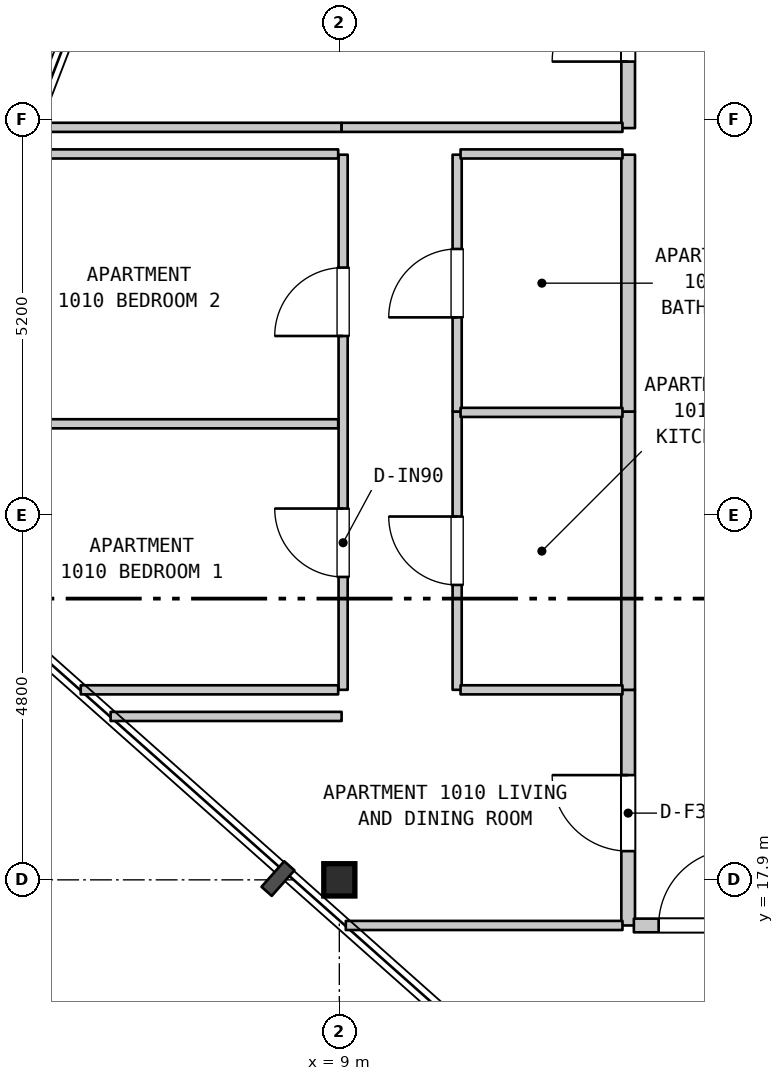
"""IFC4 building model, lengths in metres.
Left out: names, types, materials, properties, quantities, classifications, styles, units other than length and angle.
Written with IfcOpenShell. Run it as: python <this file> out.ifc"""

import sys

from ifc_helpers import new_model, si_unit, direction, frame, frame_2d, origin, origin_2d, place, context, subcontext, project, spatial, rectangle, i_section, extrude, element, fill, save


model = new_model("IFC4")
c1 = context("Model", 3, precision=1e-05, world=origin(), true_north=direction((0.0, 1.0)))
c2 = subcontext(c1, "Body", "Model", "MODEL_VIEW")
j1 = project(units=[si_unit("LENGTHUNIT", "METRE"), si_unit("PLANEANGLEUNIT", "RADIAN")], contexts=[c1])
p1 = place(None, origin())
s1 = spatial("IfcSite", under=j1, at=p1, CompositionType="ELEMENT")
p2 = place(p1, origin())
s2 = spatial("IfcBuilding", under=s1, at=p2, CompositionType="ELEMENT")
p3 = place(p2, frame((0.0, 0.0, 46.2)))
s3 = spatial("IfcBuildingStorey", under=s2, at=p3, CompositionType="ELEMENT", Elevation=46.2)
p4 = place(p3, frame((9.0, 17.9, 0.0), z_axis=(0.0, 0.0, 1.0), x_axis=(1.0, 0.0, 0.0)))
e1 = element("IfcColumn", 1, at=p4, inside=s3, PredefinedType="COLUMN", context=c2, shape_type="SweptSolid", body=[
    extrude(i_section(OverallWidth=0.409, OverallDepth=0.425, WebThickness=0.032, FlangeThickness=0.052, FilletRadius=0.015, at=origin_2d()), origin(), (0.0, 0.0, 1.0), 3.7),
])
p5 = place(p3, frame((9.05, 20.4, 0.0), z_axis=(0.0, 0.0, 1.0), x_axis=(0.0, 1.0, 0.0)))
e2 = element("IfcWall", 2, at=p5, inside=s3, PredefinedType="PARTITIONING", context=c2, shape_type="SweptSolid", body=[
    extrude(rectangle(XDim=7.04, YDim=0.12, at=frame_2d((3.52, 0.0))), origin(), (0.0, 0.0, 1.0), 2.785),
])
p6 = place(p5, frame((1.485, 0.0, 0.0)))
e3 = element("IfcOpeningElement", 3, at=p6, cuts=e2, PredefinedType="OPENING", context=c2, shape_type="SweptSolid", body=[
    extrude(rectangle(XDim=0.9, YDim=2.15, at=frame_2d((0.45, 1.075))), frame((0.0, 0.07, 0.0), z_axis=(0.0, -1.0, 0.0), x_axis=(1.0, 0.0, 0.0)), (0.0, 0.0, 1.0), 0.14),
])
p7 = place(p5, frame((4.655, 0.0, 0.0)))
e4 = element("IfcOpeningElement", 4, at=p7, cuts=e2, PredefinedType="OPENING", context=c2, shape_type="SweptSolid", body=[
    extrude(rectangle(XDim=0.9, YDim=2.15, at=frame_2d((0.45, 1.075))), frame((0.0, 0.07, 0.0), z_axis=(0.0, -1.0, 0.0), x_axis=(1.0, 0.0, 0.0)), (0.0, 0.0, 1.0), 0.14),
])
p8 = place(p3, frame((10.55, 20.4, 0.0), z_axis=(0.0, 0.0, 1.0), x_axis=(0.0, 1.0, 0.0)))
e5 = element("IfcWall", 5, at=p8, inside=s3, PredefinedType="PARTITIONING", context=c2, shape_type="SweptSolid", body=[
    extrude(rectangle(XDim=3.661, YDim=0.12, at=frame_2d((1.831, 0.0))), origin(), (0.0, 0.0, 1.0), 3.385),
])
p9 = place(p8, frame((1.38, 0.0, 0.0)))
e6 = element("IfcOpeningElement", 6, at=p9, cuts=e5, PredefinedType="OPENING", context=c2, shape_type="SweptSolid", body=[
    extrude(rectangle(XDim=0.9, YDim=2.15, at=frame_2d((0.45, 1.075))), frame((0.0, 0.07, 0.0), z_axis=(0.0, -1.0, 0.0), x_axis=(1.0, 0.0, 0.0)), (0.0, 0.0, 1.0), 0.14),
])
p10 = place(p3, frame((10.55, 24.061, 0.0), z_axis=(0.0, 0.0, 1.0), x_axis=(0.0, 1.0, 0.0)))
e7 = element("IfcWall", 7, at=p10, inside=s3, PredefinedType="PARTITIONING", context=c2, shape_type="SweptSolid", body=[
    extrude(rectangle(XDim=3.379, YDim=0.12, at=frame_2d((1.689, 0.0))), origin(), (0.0, 0.0, 1.0), 3.385),
])
p11 = place(p10, frame((1.239, 0.0, 0.0)))
e8 = element("IfcOpeningElement", 8, at=p11, cuts=e7, PredefinedType="OPENING", context=c2, shape_type="SweptSolid", body=[
    extrude(rectangle(XDim=0.9, YDim=2.1, at=frame_2d((0.45, 1.05))), frame((0.0, 0.07, 0.0), z_axis=(0.0, -1.0, 0.0), x_axis=(1.0, 0.0, 0.0)), (0.0, 0.0, 1.0), 0.14),
])
p12 = place(p3, frame((12.8, 17.3, 0.0), z_axis=(0.0, 0.0, 1.0), x_axis=(0.0, 1.0, 0.0)))
e9 = element("IfcWall", 9, at=p12, inside=s3, PredefinedType="STANDARD", context=c2, shape_type="SweptSolid", body=[
    extrude(rectangle(XDim=3.1, YDim=0.18, at=frame_2d((1.55, 0.0))), origin(), (0.0, 0.0, 1.0), 3.385),
])
p13 = place(p12, frame((0.978, 0.0, 0.0)))
e10 = element("IfcOpeningElement", 10, at=p13, cuts=e9, PredefinedType="OPENING", context=c2, shape_type="SweptSolid", body=[
    extrude(rectangle(XDim=1.0, YDim=2.15, at=frame_2d((0.5, 1.075))), frame((0.0, 0.1, 0.0), z_axis=(0.0, -1.0, 0.0), x_axis=(1.0, 0.0, 0.0)), (0.0, 0.0, 1.0), 0.2),
])
p14 = place(p3, frame((12.8, 20.4, 0.0), z_axis=(0.0, 0.0, 1.0), x_axis=(0.0, 1.0, 0.0)))
e11 = element("IfcWall", 11, at=p14, inside=s3, PredefinedType="STANDARD", context=c2, shape_type="SweptSolid", body=[
    extrude(rectangle(XDim=3.661, YDim=0.18, at=frame_2d((1.831, 0.0))), origin(), (0.0, 0.0, 1.0), 3.385),
])
p15 = place(p3, frame((12.8, 24.061, 0.0), z_axis=(0.0, 0.0, 1.0), x_axis=(0.0, 1.0, 0.0)))
e12 = element("IfcWall", 12, at=p15, inside=s3, PredefinedType="STANDARD", context=c2, shape_type="SweptSolid", body=[
    extrude(rectangle(XDim=3.379, YDim=0.18, at=frame_2d((1.689, 0.0))), origin(), (0.0, 0.0, 1.0), 3.385),
])
p16 = place(p3, frame((12.8, 27.79, 0.0), z_axis=(0.0, 0.0, 1.0), x_axis=(0.0, 1.0, 0.0)))
e13 = element("IfcWall", 13, at=p16, inside=s3, PredefinedType="STANDARD", context=c2, shape_type="SweptSolid", body=[
    extrude(rectangle(XDim=2.75, YDim=0.18, at=frame_2d((1.375, 0.0))), origin(), (0.0, 0.0, 1.0), 3.385),
])
p17 = place(p16, frame((0.875, 0.0, 0.0)))
e14 = element("IfcOpeningElement", 14, at=p17, cuts=e13, PredefinedType="OPENING", context=c2, shape_type="SweptSolid", body=[
    extrude(rectangle(XDim=1.0, YDim=2.15, at=frame_2d((0.5, 1.075))), frame((0.0, 0.1, 0.0), z_axis=(0.0, -1.0, 0.0), x_axis=(1.0, 0.0, 0.0)), (0.0, 0.0, 1.0), 0.2),
])
p18 = place(p3, frame((9.085, 17.3, 0.0), z_axis=(0.0, 0.0, 1.0), x_axis=(1.0, 0.0, 0.0)))
e15 = element("IfcWall", 15, at=p18, inside=s3, PredefinedType="PARTITIONING", context=c2, shape_type="SweptSolid", body=[
    extrude(rectangle(XDim=3.64, YDim=0.12, at=frame_2d((1.82, 0.0))), origin(), (0.0, 0.0, 1.0), 3.385),
])
p19 = place(p3, frame((12.875, 17.3, 0.0), z_axis=(0.0, 0.0, 1.0), x_axis=(1.0, 0.0, 0.0)))
e16 = element("IfcWall", 16, at=p19, inside=s3, PredefinedType="STANDARD", context=c2, shape_type="SweptSolid", body=[
    extrude(rectangle(XDim=3.28, YDim=0.18, at=frame_2d((1.64, 0.0))), origin(), (0.0, 0.0, 1.0), 3.385),
])
p20 = place(p19, frame((0.326, 0.0, 0.0)))
e17 = element("IfcOpeningElement", 17, at=p20, cuts=e16, PredefinedType="OPENING", context=c2, shape_type="SweptSolid", body=[
    extrude(rectangle(XDim=1.0, YDim=2.15, at=frame_2d((0.5, 1.075))), frame((0.0, 0.1, 0.0), z_axis=(0.0, -1.0, 0.0), x_axis=(1.0, 0.0, 0.0)), (0.0, 0.0, 1.0), 0.2),
])
p21 = place(p3, frame((5.991, 20.05, 0.0), z_axis=(0.0, 0.0, 1.0), x_axis=(1.0, 0.0, 0.0)))
e18 = element("IfcWall", 18, at=p21, inside=s3, PredefinedType="PARTITIONING", context=c2, shape_type="SweptSolid", body=[
    extrude(rectangle(XDim=3.039, YDim=0.12, at=frame_2d((1.52, 0.0))), origin(), (0.0, 0.0, 1.0), 3.385),
])
p22 = place(p3, frame((5.598, 20.4, 0.0), z_axis=(0.0, 0.0, 1.0), x_axis=(1.0, 0.0, 0.0)))
e19 = element("IfcWall", 19, at=p22, inside=s3, PredefinedType="PARTITIONING", context=c2, shape_type="SweptSolid", body=[
    extrude(rectangle(XDim=3.387, YDim=0.12, at=frame_2d((1.694, 0.0))), origin(), (0.0, 0.0, 1.0), 3.385),
])
p23 = place(p3, frame((10.595, 20.4, 0.0), z_axis=(0.0, 0.0, 1.0), x_axis=(1.0, 0.0, 0.0)))
e20 = element("IfcWall", 20, at=p23, inside=s3, PredefinedType="PARTITIONING", context=c2, shape_type="SweptSolid", body=[
    extrude(rectangle(XDim=2.13, YDim=0.12, at=frame_2d((1.065, 0.0))), origin(), (0.0, 0.0, 1.0), 3.385),
])
p24 = place(p3, frame((3.501, 23.9, 0.0), z_axis=(0.0, 0.0, 1.0), x_axis=(1.0, 0.0, 0.0)))
e21 = element("IfcWall", 21, at=p24, inside=s3, PredefinedType="PARTITIONING", context=c2, shape_type="SweptSolid", body=[
    extrude(rectangle(XDim=5.484, YDim=0.12, at=frame_2d((2.742, 0.0))), origin(), (0.0, 0.0, 1.0), 3.385),
])
p25 = place(p3, frame((10.595, 24.05, 0.0), z_axis=(0.0, 0.0, 1.0), x_axis=(1.0, 0.0, 0.0)))
e22 = element("IfcWall", 22, at=p25, inside=s3, PredefinedType="PARTITIONING", context=c2, shape_type="SweptSolid", body=[
    extrude(rectangle(XDim=2.13, YDim=0.12, at=frame_2d((1.065, 0.0))), origin(), (0.0, 0.0, 1.0), 3.385),
])
p26 = place(p3, frame((4.837, 27.45, 0.0), z_axis=(0.0, 0.0, 1.0), x_axis=(1.0, 0.0, 0.0)))
e23 = element("IfcWall", 23, at=p26, inside=s3, PredefinedType="PARTITIONING", context=c2, shape_type="SweptSolid", body=[
    extrude(rectangle(XDim=4.148, YDim=0.12, at=frame_2d((2.074, 0.0))), origin(), (0.0, 0.0, 1.0), 3.385),
])
p27 = place(p3, frame((10.595, 27.45, 0.0), z_axis=(0.0, 0.0, 1.0), x_axis=(1.0, 0.0, 0.0)))
e24 = element("IfcWall", 24, at=p27, inside=s3, PredefinedType="PARTITIONING", context=c2, shape_type="SweptSolid", body=[
    extrude(rectangle(XDim=2.13, YDim=0.12, at=frame_2d((1.065, 0.0))), origin(), (0.0, 0.0, 1.0), 3.385),
])
p28 = place(p3, frame((4.971, 27.8, 0.0), z_axis=(0.0, 0.0, 1.0), x_axis=(1.0, 0.0, 0.0)))
e25 = element("IfcWall", 25, at=p28, inside=s3, PredefinedType="PARTITIONING", context=c2, shape_type="SweptSolid", body=[
    extrude(rectangle(XDim=4.059, YDim=0.12, at=frame_2d((2.03, 0.0))), origin(), (0.0, 0.0, 1.0), 3.385),
])
p29 = place(p3, frame((9.03, 27.8, 0.0), z_axis=(0.0, 0.0, 1.0), x_axis=(1.0, 0.0, 0.0)))
e26 = element("IfcWall", 26, at=p29, inside=s3, PredefinedType="PARTITIONING", context=c2, shape_type="SweptSolid", body=[
    extrude(rectangle(XDim=3.695, YDim=0.12, at=frame_2d((1.848, 0.0))), origin(), (0.0, 0.0, 1.0), 3.385),
])
p30 = place(p6, origin())
e27 = element("IfcDoor", 27, at=p30, inside=s3, OperationType="SINGLE_SWING_RIGHT", PredefinedType="DOOR", context=c2, shape_type="SweptSolid", body=[
    extrude(rectangle(XDim=0.9, YDim=2.15, at=frame_2d((0.45, 1.075))), frame((0.0, 0.025, 0.0), z_axis=(0.0, -1.0, 0.0), x_axis=(1.0, 0.0, 0.0)), (0.0, 0.0, 1.0), 0.05),
])
fill(e3, e27)
p31 = place(p7, origin())
e28 = element("IfcDoor", 28, at=p31, inside=s3, OperationType="SINGLE_SWING_LEFT", PredefinedType="DOOR", context=c2, shape_type="SweptSolid", body=[
    extrude(rectangle(XDim=0.9, YDim=2.15, at=frame_2d((0.45, 1.075))), frame((0.0, 0.025, 0.0), z_axis=(0.0, -1.0, 0.0), x_axis=(1.0, 0.0, 0.0)), (0.0, 0.0, 1.0), 0.05),
])
fill(e4, e28)
p32 = place(p9, origin())
e29 = element("IfcDoor", 29, at=p32, inside=s3, OperationType="SINGLE_SWING_RIGHT", PredefinedType="DOOR", context=c2, shape_type="SweptSolid", body=[
    extrude(rectangle(XDim=0.9, YDim=2.15, at=frame_2d((0.45, 1.075))), frame((0.0, 0.025, 0.0), z_axis=(0.0, -1.0, 0.0), x_axis=(1.0, 0.0, 0.0)), (0.0, 0.0, 1.0), 0.05),
])
fill(e6, e29)
p33 = place(p11, origin())
e30 = element("IfcDoor", 30, at=p33, inside=s3, OperationType="SINGLE_SWING_LEFT", PredefinedType="DOOR", context=c2, shape_type="SweptSolid", body=[
    extrude(rectangle(XDim=0.9, YDim=2.1, at=frame_2d((0.45, 1.05))), frame((0.0, 0.025, 0.0), z_axis=(0.0, -1.0, 0.0), x_axis=(1.0, 0.0, 0.0)), (0.0, 0.0, 1.0), 0.05),
])
fill(e8, e30)
p34 = place(p13, origin())
e31 = element("IfcDoor", 31, at=p34, inside=s3, OperationType="SINGLE_SWING_RIGHT", PredefinedType="DOOR", context=c2, shape_type="SweptSolid", body=[
    extrude(rectangle(XDim=1.0, YDim=2.15, at=frame_2d((0.5, 1.075))), frame((0.0, 0.025, 0.0), z_axis=(0.0, -1.0, 0.0), x_axis=(1.0, 0.0, 0.0)), (0.0, 0.0, 1.0), 0.05),
])
fill(e10, e31)
p35 = place(p17, origin())
e32 = element("IfcDoor", 32, at=p35, inside=s3, OperationType="SINGLE_SWING_LEFT", PredefinedType="DOOR", context=c2, shape_type="SweptSolid", body=[
    extrude(rectangle(XDim=1.0, YDim=2.15, at=frame_2d((0.5, 1.075))), frame((0.0, 0.025, 0.0), z_axis=(0.0, -1.0, 0.0), x_axis=(1.0, 0.0, 0.0)), (0.0, 0.0, 1.0), 0.05),
])
fill(e14, e32)
p36 = place(p20, origin())
e33 = element("IfcDoor", 33, at=p36, inside=s3, OperationType="SINGLE_SWING_RIGHT", PredefinedType="DOOR", context=c2, shape_type="SweptSolid", body=[
    extrude(rectangle(XDim=1.0, YDim=2.15, at=frame_2d((0.5, 1.075))), frame((0.0, 0.025, 0.0), z_axis=(0.0, -1.0, 0.0), x_axis=(1.0, 0.0, 0.0)), (0.0, 0.0, 1.0), 0.05),
])
fill(e17, e33)
save(model, sys.argv[1])
